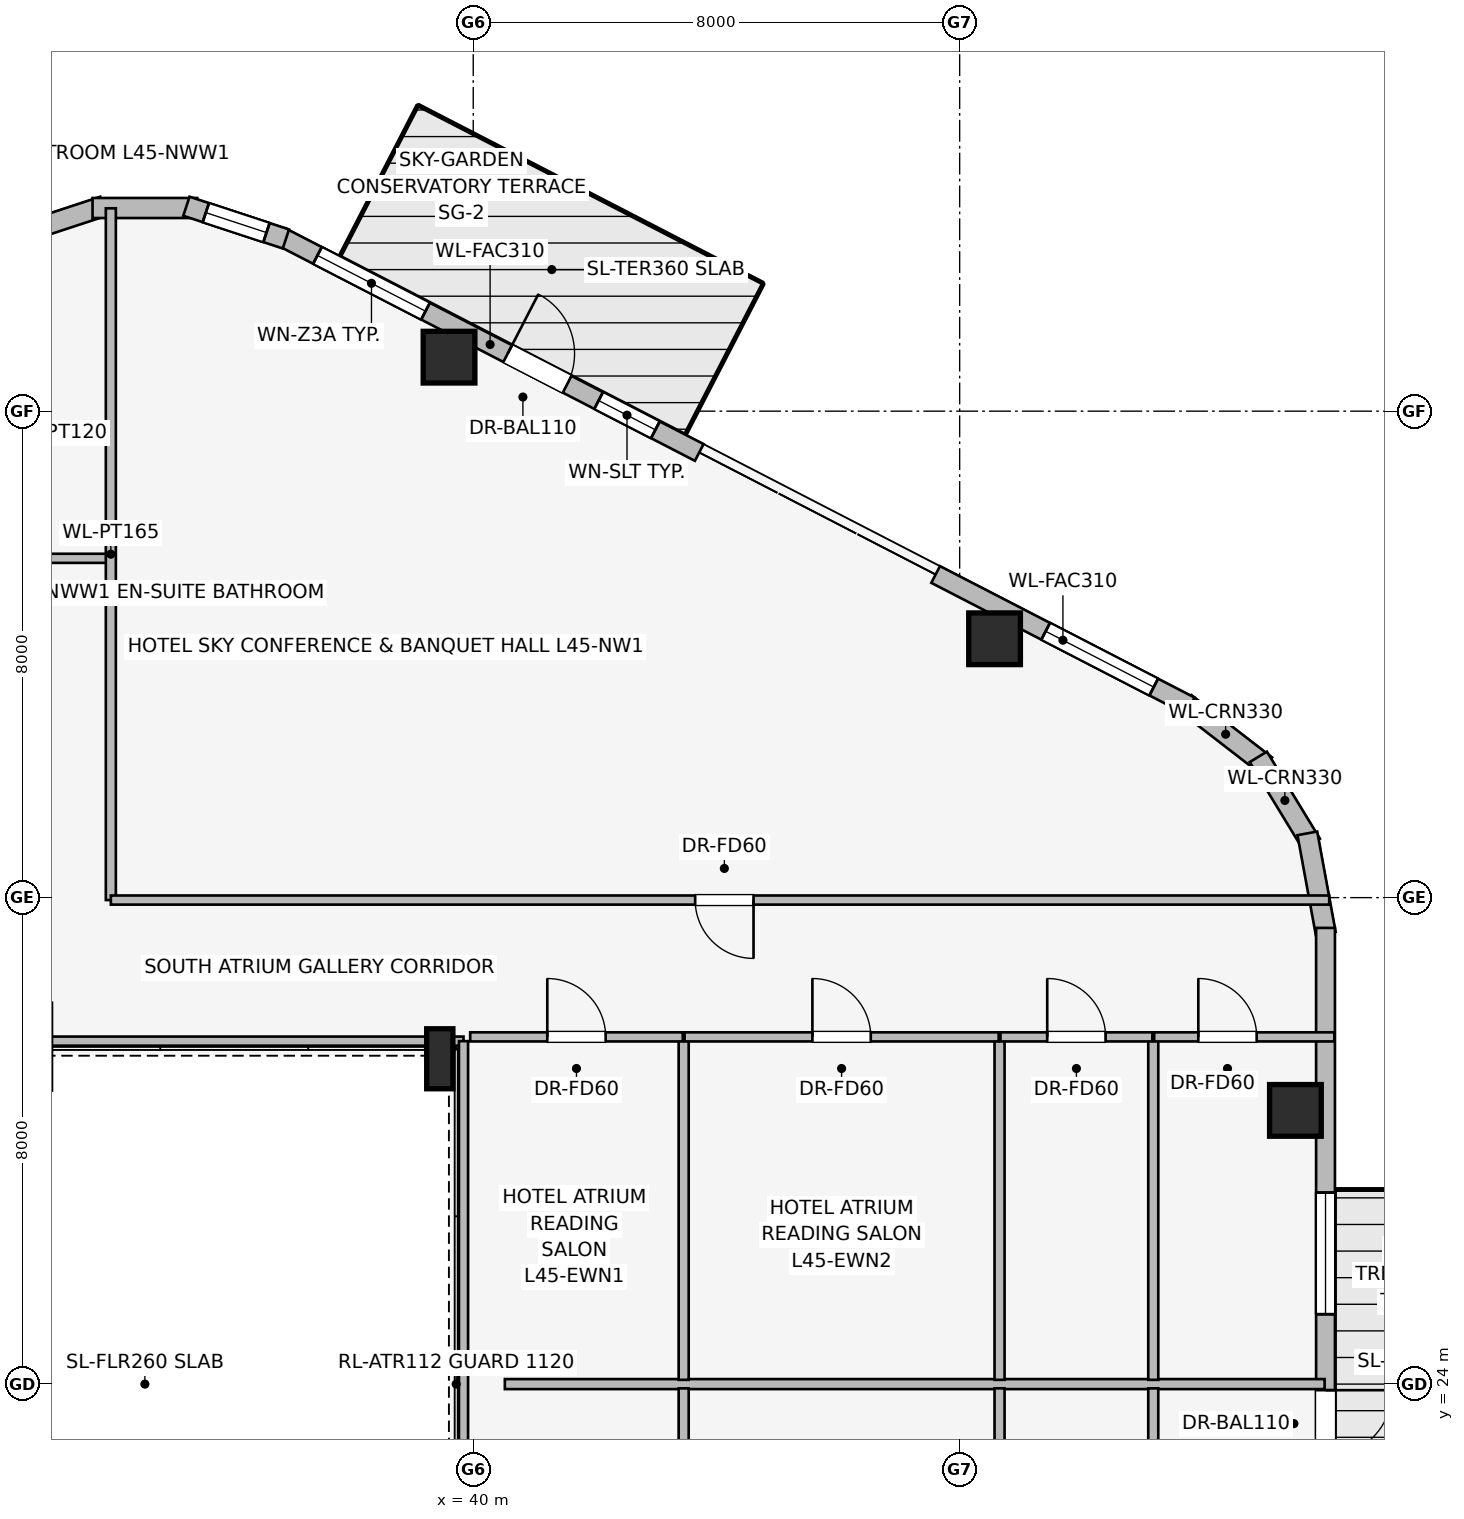
"""IFC4 building model, lengths in metres.
Left out: names, types, materials, properties, quantities, classifications, styles, units other than length and angle.
Written with IfcOpenShell. Run it as: python <this file> out.ifc"""

import sys

from ifc_helpers import new_model, si_unit, direction, frame, frame_2d, origin, origin_2d, place, context, subcontext, project, spatial, rectangle, i_section, extrude, element, fill, save


model = new_model("IFC4")
c1 = context("Model", 3, precision=1e-05, world=origin(), true_north=direction((0.0, 1.0)))
c2 = subcontext(c1, "Body", "Model", "MODEL_VIEW")
j1 = project(units=[si_unit("LENGTHUNIT", "METRE"), si_unit("PLANEANGLEUNIT", "RADIAN")], contexts=[c1])
p1 = place(None, origin())
s1 = spatial("IfcSite", under=j1, at=p1, CompositionType="ELEMENT")
p2 = place(p1, origin())
s2 = spatial("IfcBuilding", under=s1, at=p2, CompositionType="ELEMENT")
p3 = place(p2, frame((0.0, 0.0, 167.1)))
s3 = spatial("IfcBuildingStorey", under=s2, at=p3, CompositionType="ELEMENT", Elevation=167.1)
for number, where, z_axis, x_axis in (
    (1, (48.574, 36.257, 0.0), (0.0, 0.0, 1.0), (1.0, 0.0, 0.0)),
    (2, (39.602, 40.888, 0.0), (0.0, 0.0, 1.0), (1.0, 0.0, 0.0)),
    (3, (53.522, 28.501, 0.0), (0.0, 0.0, 1.0), (1.0, 0.0, 0.0)),
):
    element("IfcColumn", number, at=place(p3, frame(where, z_axis=z_axis, x_axis=x_axis)), inside=s3, PredefinedType="COLUMN", context=c2, shape_type="SweptSolid", body=[
        extrude(rectangle(XDim=0.85, YDim=0.85, at=origin_2d()), origin(), (0.0, 0.0, 1.0), 3.45),
    ])
p4 = place(p3, frame((39.45, 29.35, 0.0), z_axis=(0.0, 0.0, 1.0), x_axis=(1.0, 0.0, 0.0)))
e4 = element("IfcColumn", 4, at=p4, inside=s3, PredefinedType="COLUMN", context=c2, shape_type="SweptSolid", body=[
    extrude(i_section(OverallWidth=0.431, OverallDepth=0.987, WebThickness=0.034, FlangeThickness=0.062, at=origin_2d()), origin(), (0.0, 0.0, 1.0), 3.45),
])
p5 = place(p3, frame((51.711, 35.2, 0.0), z_axis=(0.0, 0.0, 1.0), x_axis=(0.791464279355, -0.611215423976, 0.0)))
e5 = element("IfcWall", 5, at=p5, inside=s3, PredefinedType="STANDARD", context=c2, shape_type="SweptSolid", body=[
    extrude(rectangle(XDim=1.677, YDim=0.33, at=frame_2d((0.838, 0.0))), origin(), (0.0, 0.0, 1.0), 3.19),
])
p6 = place(p3, frame((52.912, 34.315, 0.0), z_axis=(0.0, 0.0, 1.0), x_axis=(0.520219286058, -0.85403272444, 0.0)))
e6 = element("IfcWall", 6, at=p6, inside=s3, PredefinedType="STANDARD", context=c2, shape_type="SweptSolid", body=[
    extrude(rectangle(XDim=1.678, YDim=0.33, at=frame_2d((0.839, 0.0))), origin(), (0.0, 0.0, 1.0), 3.19),
])
p7 = place(p3, frame((53.718, 33.057, 0.0), z_axis=(0.0, 0.0, 1.0), x_axis=(0.180717642671, -0.983535019014, 0.0)))
e7 = element("IfcWall", 7, at=p7, inside=s3, PredefinedType="STANDARD", context=c2, shape_type="SweptSolid", body=[
    extrude(rectangle(XDim=1.677, YDim=0.33, at=frame_2d((0.838, 0.0))), origin(), (0.0, 0.0, 1.0), 3.19),
])
p8 = place(p3, frame((36.838, 42.871, 0.0), z_axis=(0.0, 0.0, 1.0), x_axis=(0.888645948291, -0.458593914686, 0.0)))
e8 = element("IfcWall", 8, at=p8, inside=s3, PredefinedType="STANDARD", context=c2, shape_type="SweptSolid", body=[
    extrude(rectangle(XDim=7.741, YDim=0.31, at=frame_2d((3.871, 0.0))), origin(), (0.0, 0.0, 1.0), 3.19),
])
p9 = place(p8, frame((4.196, 0.0, 0.0)))
e9 = element("IfcOpeningElement", 9, at=p9, cuts=e8, PredefinedType="OPENING", context=c2, shape_type="SweptSolid", body=[
    extrude(rectangle(XDim=1.1, YDim=2.04, at=frame_2d((0.55, 1.02))), frame((0.0, 0.165, 0.0), z_axis=(0.0, -1.0, 0.0), x_axis=(1.0, 0.0, 0.0)), (0.0, 0.0, 1.0), 0.33),
])
p10 = place(p8, frame((0.675, 0.0, 0.75)))
e10 = element("IfcOpeningElement", 10, at=p10, cuts=e8, PredefinedType="OPENING", context=c2, shape_type="SweptSolid", body=[
    extrude(rectangle(XDim=2.0, YDim=1.5, at=frame_2d((1.0, 0.75))), frame((0.0, 0.165, 0.0), z_axis=(0.0, -1.0, 0.0), x_axis=(1.0, 0.0, 0.0)), (0.0, 0.0, 1.0), 0.33),
])
p11 = place(p8, frame((5.879, 0.0, 0.75)))
e11 = element("IfcOpeningElement", 11, at=p11, cuts=e8, PredefinedType="OPENING", context=c2, shape_type="SweptSolid", body=[
    extrude(rectangle(XDim=1.05, YDim=1.4, at=frame_2d((0.525, 0.7))), frame((0.0, 0.165, 0.0), z_axis=(0.0, -1.0, 0.0), x_axis=(1.0, 0.0, 0.0)), (0.0, 0.0, 1.0), 0.33),
])
p12 = place(p3, frame((47.605, 37.314, 0.0), z_axis=(0.0, 0.0, 1.0), x_axis=(0.888633599899, -0.458617842141, 0.0)))
e12 = element("IfcWall", 12, at=p12, inside=s3, PredefinedType="STANDARD", context=c2, shape_type="SweptSolid", body=[
    extrude(rectangle(XDim=4.712, YDim=0.31, at=frame_2d((2.356, 0.0))), origin(), (0.0, 0.0, 1.0), 3.19),
])
p13 = place(p12, frame((2.036, 0.0, 0.75)))
e13 = element("IfcOpeningElement", 13, at=p13, cuts=e12, PredefinedType="OPENING", context=c2, shape_type="SweptSolid", body=[
    extrude(rectangle(XDim=2.0, YDim=1.5, at=frame_2d((1.0, 0.75))), frame((0.0, 0.165, 0.0), z_axis=(0.0, -1.0, 0.0), x_axis=(1.0, 0.0, 0.0)), (0.0, 0.0, 1.0), 0.33),
])
p14 = place(p3, frame((32.281, 42.832, 0.0), z_axis=(0.0, 0.0, 1.0), x_axis=(0.949937416267, 0.312440242569, 0.0)))
e14 = element("IfcWall", 14, at=p14, inside=s3, PredefinedType="STANDARD", context=c2, shape_type="SweptSolid", body=[
    extrude(rectangle(XDim=1.722, YDim=0.33, at=frame_2d((0.861, 0.0))), origin(), (0.0, 0.0, 1.0), 3.19),
])
p15 = place(p3, frame((33.739, 43.341, 0.0), z_axis=(0.0, 0.0, 1.0), x_axis=(1.0, 0.0, 0.0)))
e15 = element("IfcWall", 15, at=p15, inside=s3, PredefinedType="STANDARD", context=c2, shape_type="SweptSolid", body=[
    extrude(rectangle(XDim=1.722, YDim=0.33, at=frame_2d((0.861, 0.0))), origin(), (0.0, 0.0, 1.0), 3.19),
])
p16 = place(p3, frame((35.283, 43.37, 0.0), z_axis=(0.0, 0.0, 1.0), x_axis=(0.949937416267, -0.312440242569, 0.0)))
e16 = element("IfcWall", 16, at=p16, inside=s3, PredefinedType="STANDARD", context=c2, shape_type="SweptSolid", body=[
    extrude(rectangle(XDim=1.722, YDim=0.33, at=frame_2d((0.861, 0.0))), origin(), (0.0, 0.0, 1.0), 3.19),
])
p17 = place(p16, frame((0.336, 0.0, 0.75)))
e17 = element("IfcOpeningElement", 17, at=p17, cuts=e16, PredefinedType="OPENING", context=c2, shape_type="SweptSolid", body=[
    extrude(rectangle(XDim=1.05, YDim=1.4, at=frame_2d((0.525, 0.7))), frame((0.0, 0.175, 0.0), z_axis=(0.0, -1.0, 0.0), x_axis=(1.0, 0.0, 0.0)), (0.0, 0.0, 1.0), 0.35),
])
p18 = place(p3, frame((54.017, 31.502, 0.0), z_axis=(0.0, 0.0, 1.0), x_axis=(0.0, -1.0, 0.0)))
e18 = element("IfcWall", 18, at=p18, inside=s3, PredefinedType="STANDARD", context=c2, shape_type="SweptSolid", body=[
    extrude(rectangle(XDim=15.004, YDim=0.31, at=frame_2d((7.502, 0.0))), origin(), (0.0, 0.0, 1.0), 3.19),
])
p19 = place(p18, frame((7.602, 0.0, 0.0)))
e19 = element("IfcOpeningElement", 19, at=p19, cuts=e18, PredefinedType="OPENING", context=c2, shape_type="SweptSolid", body=[
    extrude(rectangle(XDim=1.1, YDim=2.04, at=frame_2d((0.55, 1.02))), frame((0.0, 0.165, 0.0), z_axis=(0.0, -1.0, 0.0), x_axis=(1.0, 0.0, 0.0)), (0.0, 0.0, 1.0), 0.33),
])
p20 = place(p18, frame((4.353, 0.0, 0.75)))
e20 = element("IfcOpeningElement", 20, at=p20, cuts=e18, PredefinedType="OPENING", context=c2, shape_type="SweptSolid", body=[
    extrude(rectangle(XDim=2.0, YDim=1.5, at=frame_2d((1.0, 0.75))), frame((0.0, 0.165, 0.0), z_axis=(0.0, -1.0, 0.0), x_axis=(1.0, 0.0, 0.0)), (0.0, 0.0, 1.0), 0.33),
])
p21 = place(p18, frame((9.555, 0.0, 0.75)))
e21 = element("IfcOpeningElement", 21, at=p21, cuts=e18, PredefinedType="OPENING", context=c2, shape_type="SweptSolid", body=[
    extrude(rectangle(XDim=1.35, YDim=1.45, at=frame_2d((0.675, 0.725))), frame((0.0, 0.165, 0.0), z_axis=(0.0, -1.0, 0.0), x_axis=(1.0, 0.0, 0.0)), (0.0, 0.0, 1.0), 0.33),
])
p22 = place(p3, frame((39.84, 29.64, 0.0), z_axis=(0.0, 0.0, 1.0), x_axis=(-1.0, 0.0, 0.0)))
e22 = element("IfcWall", 22, at=p22, inside=s3, PredefinedType="PARTITIONING", context=c2, shape_type="SweptSolid", body=[
    extrude(rectangle(XDim=12.2, YDim=0.15, at=frame_2d((6.1, 0.0))), origin(), (0.0, 0.0, 1.0), 2.331),
])
p23 = place(p3, frame((39.84, 18.36, 0.0), z_axis=(0.0, 0.0, 1.0), x_axis=(0.0, 1.0, 0.0)))
e23 = element("IfcWall", 23, at=p23, inside=s3, PredefinedType="PARTITIONING", context=c2, shape_type="SweptSolid", body=[
    extrude(rectangle(XDim=11.28, YDim=0.15, at=frame_2d((5.64, 0.0))), origin(), (0.0, 0.0, 1.0), 3.19),
])
p24 = place(p3, frame((34.0, 39.64, 0.0), z_axis=(0.0, 0.0, 1.0), x_axis=(-1.0, 0.0, 0.0)))
e24 = element("IfcWall", 24, at=p24, inside=s3, PredefinedType="PARTITIONING", context=c2, shape_type="SweptSolid", body=[
    extrude(rectangle(XDim=2.34, YDim=0.12, at=frame_2d((1.17, 0.0))), origin(), (0.0, 0.0, 1.0), 3.19),
])
p25 = place(p3, frame((34.0, 37.58, 0.0), z_axis=(0.0, 0.0, 1.0), x_axis=(-1.0, 0.0, 0.0)))
e25 = element("IfcWall", 25, at=p25, inside=s3, PredefinedType="PARTITIONING", context=c2, shape_type="SweptSolid", body=[
    extrude(rectangle(XDim=12.075, YDim=0.15, at=frame_2d((6.038, 0.0))), origin(), (0.0, 0.0, 1.0), 2.582),
])
p26 = place(p25, frame((4.96, 0.0, 0.0)))
e26 = element("IfcOpeningElement", 26, at=p26, cuts=e25, PredefinedType="OPENING", context=c2, shape_type="SweptSolid", body=[
    extrude(rectangle(XDim=0.96, YDim=2.0, at=frame_2d((0.48, 1.0))), frame((0.0, 0.085, 0.0), z_axis=(0.0, -1.0, 0.0), x_axis=(1.0, 0.0, 0.0)), (0.0, 0.0, 1.0), 0.17),
])
p27 = place(p3, frame((34.04, 31.96, 0.0), z_axis=(0.0, 0.0, 1.0), x_axis=(0.0, 1.0, 0.0)))
e27 = element("IfcWall", 27, at=p27, inside=s3, PredefinedType="PARTITIONING", context=c2, shape_type="SweptSolid", body=[
    extrude(rectangle(XDim=11.376, YDim=0.165, at=frame_2d((5.688, 0.0))), origin(), (0.0, 0.0, 1.0), 3.19),
])
p28 = place(p3, frame((54.078, 31.96, 0.0), z_axis=(0.0, 0.0, 1.0), x_axis=(-1.0, 0.0, 0.0)))
e28 = element("IfcWall", 28, at=p28, inside=s3, PredefinedType="PARTITIONING", context=c2, shape_type="SweptSolid", body=[
    extrude(rectangle(XDim=20.038, YDim=0.15, at=frame_2d((10.019, 0.0))), origin(), (0.0, 0.0, 1.0), 3.19),
])
p29 = place(p28, frame((9.468, 0.0, 0.0)))
e29 = element("IfcOpeningElement", 29, at=p29, cuts=e28, PredefinedType="OPENING", context=c2, shape_type="SweptSolid", body=[
    extrude(rectangle(XDim=0.96, YDim=2.0, at=frame_2d((0.48, 1.0))), frame((0.0, 0.085, 0.0), z_axis=(0.0, -1.0, 0.0), x_axis=(1.0, 0.0, 0.0)), (0.0, 0.0, 1.0), 0.17),
])
p30 = place(p3, frame((40.52, 24.0, 0.0), z_axis=(0.0, 0.0, 1.0), x_axis=(1.0, 0.0, 0.0)))
e30 = element("IfcWall", 30, at=p30, inside=s3, PredefinedType="PARTITIONING", context=c2, shape_type="SweptSolid", body=[
    extrude(rectangle(XDim=13.482, YDim=0.165, at=frame_2d((6.741, 0.0))), origin(), (0.0, 0.0, 1.0), 3.19),
])
for number, where, z_axis, x_axis in (
    (31, (43.461, 24.07, 0.0), (0.0, 0.0, 1.0), (0.0, 1.0, 0.0)),
    (32, (48.656, 24.07, 0.0), (0.0, 0.0, 1.0), (0.0, 1.0, 0.0)),
    (33, (51.184, 24.07, 0.0), (0.0, 0.0, 1.0), (0.0, 1.0, 0.0)),
):
    element("IfcWall", number, at=place(p3, frame(where, z_axis=z_axis, x_axis=x_axis)), inside=s3, PredefinedType="PARTITIONING", context=c2, shape_type="SweptSolid", body=[
        extrude(rectangle(XDim=5.64, YDim=0.165, at=frame_2d((2.82, 0.0))), origin(), (0.0, 0.0, 1.0), 3.19),
    ])
p31 = place(p3, frame((39.95, 29.71, 0.0), z_axis=(0.0, 0.0, 1.0), x_axis=(1.0, 0.0, 0.0)))
e34 = element("IfcWall", 34, at=p31, inside=s3, PredefinedType="PARTITIONING", context=c2, shape_type="SweptSolid", body=[
    extrude(rectangle(XDim=3.496, YDim=0.15, at=frame_2d((1.748, 0.0))), origin(), (0.0, 0.0, 1.0), 3.19),
])
p32 = place(p31, frame((1.268, 0.0, 0.0)))
e35 = element("IfcOpeningElement", 35, at=p32, cuts=e34, PredefinedType="OPENING", context=c2, shape_type="SweptSolid", body=[
    extrude(rectangle(XDim=0.96, YDim=2.0, at=frame_2d((0.48, 1.0))), frame((0.0, 0.085, 0.0), z_axis=(0.0, -1.0, 0.0), x_axis=(1.0, 0.0, 0.0)), (0.0, 0.0, 1.0), 0.17),
])
p33 = place(p3, frame((43.476, 29.71, 0.0), z_axis=(0.0, 0.0, 1.0), x_axis=(1.0, 0.0, 0.0)))
e36 = element("IfcWall", 36, at=p33, inside=s3, PredefinedType="PARTITIONING", context=c2, shape_type="SweptSolid", body=[
    extrude(rectangle(XDim=5.165, YDim=0.15, at=frame_2d((2.583, 0.0))), origin(), (0.0, 0.0, 1.0), 3.19),
])
p34 = place(p33, frame((2.102, 0.0, 0.0)))
e37 = element("IfcOpeningElement", 37, at=p34, cuts=e36, PredefinedType="OPENING", context=c2, shape_type="SweptSolid", body=[
    extrude(rectangle(XDim=0.96, YDim=2.0, at=frame_2d((0.48, 1.0))), frame((0.0, 0.085, 0.0), z_axis=(0.0, -1.0, 0.0), x_axis=(1.0, 0.0, 0.0)), (0.0, 0.0, 1.0), 0.17),
])
p35 = place(p3, frame((48.671, 29.71, 0.0), z_axis=(0.0, 0.0, 1.0), x_axis=(1.0, 0.0, 0.0)))
e38 = element("IfcWall", 38, at=p35, inside=s3, PredefinedType="PARTITIONING", context=c2, shape_type="SweptSolid", body=[
    extrude(rectangle(XDim=2.498, YDim=0.15, at=frame_2d((1.249, 0.0))), origin(), (0.0, 0.0, 1.0), 3.19),
])
p36 = place(p35, frame((0.769, 0.0, 0.0)))
e39 = element("IfcOpeningElement", 39, at=p36, cuts=e38, PredefinedType="OPENING", context=c2, shape_type="SweptSolid", body=[
    extrude(rectangle(XDim=0.96, YDim=2.0, at=frame_2d((0.48, 1.0))), frame((0.0, 0.085, 0.0), z_axis=(0.0, -1.0, 0.0), x_axis=(1.0, 0.0, 0.0)), (0.0, 0.0, 1.0), 0.17),
])
p37 = place(p3, frame((51.199, 29.71, 0.0), z_axis=(0.0, 0.0, 1.0), x_axis=(1.0, 0.0, 0.0)))
e40 = element("IfcWall", 40, at=p37, inside=s3, PredefinedType="PARTITIONING", context=c2, shape_type="SweptSolid", body=[
    extrude(rectangle(XDim=2.963, YDim=0.15, at=frame_2d((1.481, 0.0))), origin(), (0.0, 0.0, 1.0), 3.19),
])
p38 = place(p37, frame((0.726, 0.0, 0.0)))
e41 = element("IfcOpeningElement", 41, at=p38, cuts=e40, PredefinedType="OPENING", context=c2, shape_type="SweptSolid", body=[
    extrude(rectangle(XDim=0.96, YDim=2.0, at=frame_2d((0.48, 1.0))), frame((0.0, 0.085, 0.0), z_axis=(0.0, -1.0, 0.0), x_axis=(1.0, 0.0, 0.0)), (0.0, 0.0, 1.0), 0.17),
])
for number, where, z_axis, x_axis in (
    (42, (43.461, 18.29, 0.0), (0.0, 0.0, 1.0), (0.0, 1.0, 0.0)),
    (43, (48.656, 18.29, 0.0), (0.0, 0.0, 1.0), (0.0, 1.0, 0.0)),
    (44, (51.184, 18.29, 0.0), (0.0, 0.0, 1.0), (0.0, 1.0, 0.0)),
):
    element("IfcWall", number, at=place(p3, frame(where, z_axis=z_axis, x_axis=x_axis)), inside=s3, PredefinedType="PARTITIONING", context=c2, shape_type="SweptSolid", body=[
        extrude(rectangle(XDim=5.64, YDim=0.165, at=frame_2d((2.82, 0.0))), origin(), (0.0, 0.0, 1.0), 3.19),
    ])
p39 = place(p9, origin())
e45 = element("IfcDoor", 45, at=p39, inside=s3, OperationType="SINGLE_SWING_LEFT", PredefinedType="DOOR", context=c2, shape_type="SweptSolid", body=[
    extrude(rectangle(XDim=1.1, YDim=2.04, at=frame_2d((0.55, 1.02))), frame((0.0, 0.025, 0.0), z_axis=(0.0, -1.0, 0.0), x_axis=(1.0, 0.0, 0.0)), (0.0, 0.0, 1.0), 0.05),
])
fill(e9, e45)
p40 = place(p10, origin())
e46 = element("IfcWindow", 46, at=p40, inside=s3, PartitioningType="SINGLE_PANEL", PredefinedType="WINDOW", context=c2, shape_type="SweptSolid", body=[
    extrude(rectangle(XDim=2.0, YDim=1.5, at=frame_2d((1.0, 0.75))), frame((0.0, 0.03, 0.0), z_axis=(0.0, -1.0, 0.0), x_axis=(1.0, 0.0, 0.0)), (0.0, 0.0, 1.0), 0.06),
])
fill(e10, e46)
p41 = place(p11, origin())
e47 = element("IfcWindow", 47, at=p41, inside=s3, PartitioningType="SINGLE_PANEL", PredefinedType="WINDOW", context=c2, shape_type="SweptSolid", body=[
    extrude(rectangle(XDim=1.05, YDim=1.4, at=frame_2d((0.525, 0.7))), frame((0.0, 0.03, 0.0), z_axis=(0.0, -1.0, 0.0), x_axis=(1.0, 0.0, 0.0)), (0.0, 0.0, 1.0), 0.06),
])
fill(e11, e47)
p42 = place(p13, origin())
e48 = element("IfcWindow", 48, at=p42, inside=s3, PartitioningType="SINGLE_PANEL", PredefinedType="WINDOW", context=c2, shape_type="SweptSolid", body=[
    extrude(rectangle(XDim=2.0, YDim=1.5, at=frame_2d((1.0, 0.75))), frame((0.0, 0.03, 0.0), z_axis=(0.0, -1.0, 0.0), x_axis=(1.0, 0.0, 0.0)), (0.0, 0.0, 1.0), 0.06),
])
fill(e13, e48)
p43 = place(p17, origin())
e49 = element("IfcWindow", 49, at=p43, inside=s3, PartitioningType="SINGLE_PANEL", PredefinedType="WINDOW", context=c2, shape_type="SweptSolid", body=[
    extrude(rectangle(XDim=1.05, YDim=1.4, at=frame_2d((0.525, 0.7))), frame((0.0, 0.03, 0.0), z_axis=(0.0, -1.0, 0.0), x_axis=(1.0, 0.0, 0.0)), (0.0, 0.0, 1.0), 0.06),
])
fill(e17, e49)
p44 = place(p19, origin())
e50 = element("IfcDoor", 50, at=p44, inside=s3, OperationType="SINGLE_SWING_LEFT", PredefinedType="DOOR", context=c2, shape_type="SweptSolid", body=[
    extrude(rectangle(XDim=1.1, YDim=2.04, at=frame_2d((0.55, 1.02))), frame((0.0, 0.025, 0.0), z_axis=(0.0, -1.0, 0.0), x_axis=(1.0, 0.0, 0.0)), (0.0, 0.0, 1.0), 0.05),
])
fill(e19, e50)
p45 = place(p20, origin())
e51 = element("IfcWindow", 51, at=p45, inside=s3, PartitioningType="SINGLE_PANEL", PredefinedType="WINDOW", context=c2, shape_type="SweptSolid", body=[
    extrude(rectangle(XDim=2.0, YDim=1.5, at=frame_2d((1.0, 0.75))), frame((0.0, 0.03, 0.0), z_axis=(0.0, -1.0, 0.0), x_axis=(1.0, 0.0, 0.0)), (0.0, 0.0, 1.0), 0.06),
])
fill(e20, e51)
p46 = place(p29, origin())
e52 = element("IfcDoor", 52, at=p46, inside=s3, OperationType="SINGLE_SWING_LEFT", PredefinedType="DOOR", context=c2, shape_type="SweptSolid", body=[
    extrude(rectangle(XDim=0.96, YDim=2.0, at=frame_2d((0.48, 1.0))), frame((0.0, 0.025, 0.0), z_axis=(0.0, -1.0, 0.0), x_axis=(1.0, 0.0, 0.0)), (0.0, 0.0, 1.0), 0.05),
])
fill(e29, e52)
p47 = place(p32, origin())
e53 = element("IfcDoor", 53, at=p47, inside=s3, OperationType="SINGLE_SWING_LEFT", PredefinedType="DOOR", context=c2, shape_type="SweptSolid", body=[
    extrude(rectangle(XDim=0.96, YDim=2.0, at=frame_2d((0.48, 1.0))), frame((0.0, 0.025, 0.0), z_axis=(0.0, -1.0, 0.0), x_axis=(1.0, 0.0, 0.0)), (0.0, 0.0, 1.0), 0.05),
])
fill(e35, e53)
p48 = place(p34, origin())
e54 = element("IfcDoor", 54, at=p48, inside=s3, OperationType="SINGLE_SWING_LEFT", PredefinedType="DOOR", context=c2, shape_type="SweptSolid", body=[
    extrude(rectangle(XDim=0.96, YDim=2.0, at=frame_2d((0.48, 1.0))), frame((0.0, 0.025, 0.0), z_axis=(0.0, -1.0, 0.0), x_axis=(1.0, 0.0, 0.0)), (0.0, 0.0, 1.0), 0.05),
])
fill(e37, e54)
p49 = place(p36, origin())
e55 = element("IfcDoor", 55, at=p49, inside=s3, OperationType="SINGLE_SWING_LEFT", PredefinedType="DOOR", context=c2, shape_type="SweptSolid", body=[
    extrude(rectangle(XDim=0.96, YDim=2.0, at=frame_2d((0.48, 1.0))), frame((0.0, 0.025, 0.0), z_axis=(0.0, -1.0, 0.0), x_axis=(1.0, 0.0, 0.0)), (0.0, 0.0, 1.0), 0.05),
])
fill(e39, e55)
p50 = place(p38, origin())
e56 = element("IfcDoor", 56, at=p50, inside=s3, OperationType="SINGLE_SWING_LEFT", PredefinedType="DOOR", context=c2, shape_type="SweptSolid", body=[
    extrude(rectangle(XDim=0.96, YDim=2.0, at=frame_2d((0.48, 1.0))), frame((0.0, 0.025, 0.0), z_axis=(0.0, -1.0, 0.0), x_axis=(1.0, 0.0, 0.0)), (0.0, 0.0, 1.0), 0.05),
])
fill(e41, e56)
save(model, sys.argv[1])
